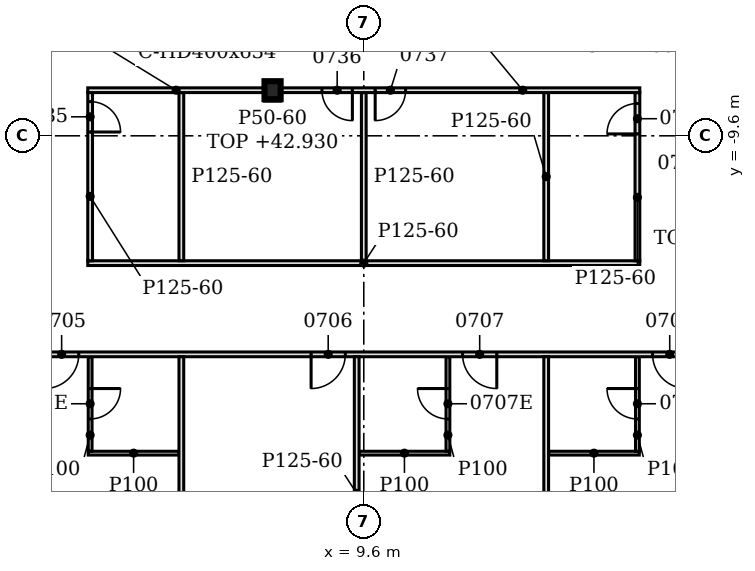
"""IFC4 building model, lengths in metres.
Left out: names, types, materials, properties, quantities, classifications, styles, units other than length and angle.
Written with IfcOpenShell. Run it as: python <this file> out.ifc"""

import sys

from ifc_helpers import new_model, si_unit, direction, frame, frame_2d, origin, origin_2d, place, context, subcontext, project, spatial, polyline, rectangle, i_section, outline, extrude, element, fill, save


model = new_model("IFC4")
c1 = context("Model", 3, precision=1e-05, world=origin(), true_north=direction((0.0, 1.0)))
c2 = subcontext(c1, "Body", "Model", "MODEL_VIEW")
j1 = project(units=[si_unit("LENGTHUNIT", "METRE"), si_unit("PLANEANGLEUNIT", "RADIAN")], contexts=[c1])
p1 = place(None, origin())
s1 = spatial("IfcSite", under=j1, at=p1, CompositionType="ELEMENT")
p2 = place(p1, origin())
s2 = spatial("IfcBuilding", under=s1, at=p2, CompositionType="ELEMENT")
p3 = place(p2, frame((0.0, 0.0, 40.2)))
s3 = spatial("IfcBuildingStorey", under=s2, at=p3, CompositionType="ELEMENT", Elevation=40.2)
p4 = place(p3, frame((7.2, -8.4, -0.15), z_axis=(0.0, 0.0, 1.0), x_axis=(1.0, 0.0, 0.0)))
e1 = element("IfcColumn", 1, at=p4, inside=s3, PredefinedType="COLUMN", context=c2, shape_type="SweptSolid", body=[
    extrude(i_section(OverallWidth=0.424, OverallDepth=0.474, WebThickness=0.048, FlangeThickness=0.077, FilletRadius=0.015, at=origin_2d()), origin(), (0.0, 0.0, 1.0), 3.6),
])
for number, where, z_axis, x_axis in (
    (2, (4.8, -23.65, 0.0), (0.0, 0.0, 1.0), (0.0, 1.0, 0.0)),
    (3, (14.4, -23.65, 0.0), (0.0, 0.0, 1.0), (0.0, 1.0, 0.0)),
):
    element("IfcWall", number, at=place(p3, frame(where, z_axis=z_axis, x_axis=x_axis)), inside=s3, PredefinedType="PARTITIONING", context=c2, shape_type="SweptSolid", body=[
        extrude(outline(polyline([(0.0, 0.0), (8.237, 0.0), (8.238, 3.45), (4.555, 3.45), (4.553, 2.88), (4.345, 2.88), (4.343, 3.45), (0.7, 3.45), (0.698, 2.93), (0.4, 2.93), (0.398, 3.45), (0.0, 3.45), (0.0, 0.0)])), frame((0.0, 0.062, 0.0), z_axis=(0.0, -1.0, 0.0), x_axis=(1.0, 0.0, 0.0)), (0.0, 0.0, 1.0), 0.125),
    ])
p5 = place(p3, frame((9.414, -22.6, 0.0), z_axis=(0.0, 0.0, 1.0), x_axis=(0.0, 1.0, 0.0)))
e4 = element("IfcWall", 4, at=p5, inside=s3, PredefinedType="PARTITIONING", context=c2, shape_type="SweptSolid", body=[
    extrude(outline(polyline([(0.0, 0.0), (7.188, 0.0), (7.188, 3.45), (3.505, 3.45), (3.503, 2.88), (3.295, 2.88), (3.293, 3.45), (0.0, 3.45), (0.0, 0.0)])), frame((0.0, 0.062, 0.0), z_axis=(0.0, -1.0, 0.0), x_axis=(1.0, 0.0, 0.0)), (0.0, 0.0, 1.0), 0.125),
])
p6 = place(p3, frame((2.35, -17.95, 0.0), z_axis=(0.0, 0.0, 1.0), x_axis=(1.0, 0.0, 0.0)))
e5 = element("IfcWall", 5, at=p6, inside=s3, PredefinedType="PARTITIONING", context=c2, shape_type="SweptSolid", body=[
    extrude(rectangle(XDim=2.387, YDim=0.1, at=frame_2d((1.194, 0.0))), origin(), (0.0, 0.0, 1.0), 3.45),
])
p7 = place(p3, frame((2.4, -17.9, 0.0), z_axis=(0.0, 0.0, 1.0), x_axis=(0.0, 1.0, 0.0)))
e6 = element("IfcWall", 6, at=p7, inside=s3, PredefinedType="PARTITIONING", context=c2, shape_type="SweptSolid", body=[
    extrude(rectangle(XDim=2.487, YDim=0.1, at=frame_2d((1.244, 0.0))), origin(), (0.0, 0.0, 1.0), 3.45),
])
p8 = place(p7, frame((0.85, 0.0, 0.0)))
e7 = element("IfcOpeningElement", 7, at=p8, cuts=e6, PredefinedType="OPENING", context=c2, shape_type="SweptSolid", body=[
    extrude(rectangle(XDim=0.8, YDim=2.1, at=frame_2d((0.4, 1.05))), frame((0.0, 0.06, 0.0), z_axis=(0.0, -1.0, 0.0), x_axis=(1.0, 0.0, 0.0)), (0.0, 0.0, 1.0), 0.12),
])
p9 = place(p3, frame((9.477, -17.95, 0.0), z_axis=(0.0, 0.0, 1.0), x_axis=(1.0, 0.0, 0.0)))
e8 = element("IfcWall", 8, at=p9, inside=s3, PredefinedType="PARTITIONING", context=c2, shape_type="SweptSolid", body=[
    extrude(rectangle(XDim=2.387, YDim=0.1, at=frame_2d((1.194, 0.0))), origin(), (0.0, 0.0, 1.0), 3.45),
])
p10 = place(p3, frame((11.814, -17.9, 0.0), z_axis=(0.0, 0.0, 1.0), x_axis=(0.0, 1.0, 0.0)))
e9 = element("IfcWall", 9, at=p10, inside=s3, PredefinedType="PARTITIONING", context=c2, shape_type="SweptSolid", body=[
    extrude(rectangle(XDim=2.487, YDim=0.1, at=frame_2d((1.244, 0.0))), origin(), (0.0, 0.0, 1.0), 3.45),
])
p11 = place(p10, frame((0.85, 0.0, 0.0)))
e10 = element("IfcOpeningElement", 10, at=p11, cuts=e9, PredefinedType="OPENING", context=c2, shape_type="SweptSolid", body=[
    extrude(rectangle(XDim=0.8, YDim=2.1, at=frame_2d((0.4, 1.05))), frame((0.0, 0.06, 0.0), z_axis=(0.0, -1.0, 0.0), x_axis=(1.0, 0.0, 0.0)), (0.0, 0.0, 1.0), 0.12),
])
p12 = place(p3, frame((14.462, -17.95, 0.0), z_axis=(0.0, 0.0, 1.0), x_axis=(1.0, 0.0, 0.0)))
e11 = element("IfcWall", 11, at=p12, inside=s3, PredefinedType="PARTITIONING", context=c2, shape_type="SweptSolid", body=[
    extrude(rectangle(XDim=2.388, YDim=0.1, at=frame_2d((1.194, 0.0))), origin(), (0.0, 0.0, 1.0), 3.45),
])
p13 = place(p3, frame((16.8, -17.9, 0.0), z_axis=(0.0, 0.0, 1.0), x_axis=(0.0, 1.0, 0.0)))
e12 = element("IfcWall", 12, at=p13, inside=s3, PredefinedType="PARTITIONING", context=c2, shape_type="SweptSolid", body=[
    extrude(rectangle(XDim=2.487, YDim=0.1, at=frame_2d((1.244, 0.0))), origin(), (0.0, 0.0, 1.0), 3.45),
])
p14 = place(p13, frame((0.85, 0.0, 0.0)))
e13 = element("IfcOpeningElement", 13, at=p14, cuts=e12, PredefinedType="OPENING", context=c2, shape_type="SweptSolid", body=[
    extrude(rectangle(XDim=0.8, YDim=2.1, at=frame_2d((0.4, 1.05))), frame((0.0, 0.06, 0.0), z_axis=(0.0, -1.0, 0.0), x_axis=(1.0, 0.0, 0.0)), (0.0, 0.0, 1.0), 0.12),
])
p15 = place(p3, frame((-20.15, -15.35, 0.0), z_axis=(0.0, 0.0, 1.0), x_axis=(1.0, 0.0, 0.0)))
e14 = element("IfcWall", 14, at=p15, inside=s3, PredefinedType="PARTITIONING", context=c2, shape_type="SweptSolid", body=[
    extrude(outline(polyline([(0.0, 0.0), (39.287, 0.0), (39.288, 2.73), (39.2, 2.73), (39.198, 3.45), (27.5, 3.45), (27.498, 2.73), (27.2, 2.73), (27.198, 3.45), (15.5, 3.45), (15.498, 2.73), (15.2, 2.73), (15.198, 3.45), (5.9, 3.45), (5.898, 2.93), (5.6, 2.93), (5.598, 3.45), (0.0, 3.45), (0.0, 0.0)])), frame((0.0, 0.062, 0.0), z_axis=(0.0, -1.0, 0.0), x_axis=(1.0, 0.0, 0.0)), (0.0, 0.0, 1.0), 0.125),
])
p16 = place(p15, frame((4.55, 0.0, 0.0)))
e15 = element("IfcOpeningElement", 15, at=p16, cuts=e14, PredefinedType="OPENING", context=c2, shape_type="SweptSolid", body=[
    extrude(rectangle(XDim=0.9, YDim=2.1, at=frame_2d((0.45, 1.05))), frame((0.0, 0.073, 0.0), z_axis=(0.0, -1.0, 0.0), x_axis=(1.0, 0.0, 0.0)), (0.0, 0.0, 1.0), 0.145),
])
p17 = place(p15, frame((7.136, 0.0, 0.0)))
e16 = element("IfcOpeningElement", 16, at=p17, cuts=e14, PredefinedType="OPENING", context=c2, shape_type="SweptSolid", body=[
    extrude(rectangle(XDim=0.9, YDim=2.1, at=frame_2d((0.45, 1.05))), frame((0.0, 0.073, 0.0), z_axis=(0.0, -1.0, 0.0), x_axis=(1.0, 0.0, 0.0)), (0.0, 0.0, 1.0), 0.145),
])
p18 = place(p15, frame((14.15, 0.0, 0.0)))
e17 = element("IfcOpeningElement", 17, at=p18, cuts=e14, PredefinedType="OPENING", context=c2, shape_type="SweptSolid", body=[
    extrude(rectangle(XDim=0.9, YDim=2.1, at=frame_2d((0.45, 1.05))), frame((0.0, 0.073, 0.0), z_axis=(0.0, -1.0, 0.0), x_axis=(1.0, 0.0, 0.0)), (0.0, 0.0, 1.0), 0.145),
])
p19 = place(p15, frame((16.55, 0.0, 0.0)))
e18 = element("IfcOpeningElement", 18, at=p19, cuts=e14, PredefinedType="OPENING", context=c2, shape_type="SweptSolid", body=[
    extrude(rectangle(XDim=0.9, YDim=2.1, at=frame_2d((0.45, 1.05))), frame((0.0, 0.073, 0.0), z_axis=(0.0, -1.0, 0.0), x_axis=(1.0, 0.0, 0.0)), (0.0, 0.0, 1.0), 0.145),
])
p20 = place(p15, frame((21.35, 0.0, 0.0)))
e19 = element("IfcOpeningElement", 19, at=p20, cuts=e14, PredefinedType="OPENING", context=c2, shape_type="SweptSolid", body=[
    extrude(rectangle(XDim=0.9, YDim=2.1, at=frame_2d((0.45, 1.05))), frame((0.0, 0.073, 0.0), z_axis=(0.0, -1.0, 0.0), x_axis=(1.0, 0.0, 0.0)), (0.0, 0.0, 1.0), 0.145),
])
p21 = place(p15, frame((28.364, 0.0, 0.0)))
e20 = element("IfcOpeningElement", 20, at=p21, cuts=e14, PredefinedType="OPENING", context=c2, shape_type="SweptSolid", body=[
    extrude(rectangle(XDim=0.9, YDim=2.1, at=frame_2d((0.45, 1.05))), frame((0.0, 0.073, 0.0), z_axis=(0.0, -1.0, 0.0), x_axis=(1.0, 0.0, 0.0)), (0.0, 0.0, 1.0), 0.145),
])
p22 = place(p15, frame((32.35, 0.0, 0.0)))
e21 = element("IfcOpeningElement", 21, at=p22, cuts=e14, PredefinedType="OPENING", context=c2, shape_type="SweptSolid", body=[
    extrude(rectangle(XDim=0.9, YDim=2.1, at=frame_2d((0.45, 1.05))), frame((0.0, 0.073, 0.0), z_axis=(0.0, -1.0, 0.0), x_axis=(1.0, 0.0, 0.0)), (0.0, 0.0, 1.0), 0.145),
])
p23 = place(p15, frame((37.35, 0.0, 0.0)))
e22 = element("IfcOpeningElement", 22, at=p23, cuts=e14, PredefinedType="OPENING", context=c2, shape_type="SweptSolid", body=[
    extrude(rectangle(XDim=0.9, YDim=2.1, at=frame_2d((0.45, 1.05))), frame((0.0, 0.073, 0.0), z_axis=(0.0, -1.0, 0.0), x_axis=(1.0, 0.0, 0.0)), (0.0, 0.0, 1.0), 0.145),
])
p24 = place(p3, frame((2.337, -12.95, 0.0), z_axis=(0.0, 0.0, 1.0), x_axis=(1.0, 0.0, 0.0)))
e23 = element("IfcWall", 23, at=p24, inside=s3, PredefinedType="PARTITIONING", context=c2, shape_type="SweptSolid", body=[
    extrude(outline(polyline([(0.0, 0.0), (14.525, 0.0), (14.525, 3.45), (5.012, 3.45), (5.01, 2.73), (4.712, 2.73), (4.71, 3.45), (0.0, 3.45), (0.0, 0.0)])), frame((0.0, 0.062, 0.0), z_axis=(0.0, -1.0, 0.0), x_axis=(1.0, 0.0, 0.0)), (0.0, 0.0, 1.0), 0.125),
])
p25 = place(p3, frame((2.4, -12.887, 0.0), z_axis=(0.0, 0.0, 1.0), x_axis=(0.0, 1.0, 0.0)))
e24 = element("IfcWall", 24, at=p25, inside=s3, PredefinedType="PARTITIONING", context=c2, shape_type="SweptSolid", body=[
    extrude(outline(polyline([(0.0, 0.0), (4.425, 0.0), (4.425, 2.83), (4.337, 2.83), (4.335, 3.45), (0.0, 3.45), (0.0, 0.0)])), frame((0.0, 0.062, 0.0), z_axis=(0.0, -1.0, 0.0), x_axis=(1.0, 0.0, 0.0)), (0.0, 0.0, 1.0), 0.125),
])
p26 = place(p25, frame((3.387, 0.0, 0.0)))
e25 = element("IfcOpeningElement", 25, at=p26, cuts=e24, PredefinedType="OPENING", context=c2, shape_type="SweptSolid", body=[
    extrude(rectangle(XDim=0.8, YDim=2.1, at=frame_2d((0.4, 1.05))), frame((0.0, 0.073, 0.0), z_axis=(0.0, -1.0, 0.0), x_axis=(1.0, 0.0, 0.0)), (0.0, 0.0, 1.0), 0.145),
])
for number, where, z_axis, x_axis in (
    (26, (4.8, -12.887, 0.0), (0.0, 0.0, 1.0), (0.0, 1.0, 0.0)),
    (27, (9.6, -12.887, 0.0), (0.0, 0.0, 1.0), (0.0, 1.0, 0.0)),
    (28, (14.4, -12.887, 0.0), (0.0, 0.0, 1.0), (0.0, 1.0, 0.0)),
):
    element("IfcWall", number, at=place(p3, frame(where, z_axis=z_axis, x_axis=x_axis)), inside=s3, PredefinedType="PARTITIONING", context=c2, shape_type="SweptSolid", body=[
        extrude(outline(polyline([(0.0, 0.0), (4.425, 0.0), (4.425, 2.83), (4.337, 2.83), (4.335, 3.45), (0.0, 3.45), (0.0, 0.0)])), frame((0.0, 0.062, 0.0), z_axis=(0.0, -1.0, 0.0), x_axis=(1.0, 0.0, 0.0)), (0.0, 0.0, 1.0), 0.125),
    ])
p27 = place(p3, frame((16.8, -12.887, 0.0), z_axis=(0.0, 0.0, 1.0), x_axis=(0.0, 1.0, 0.0)))
e29 = element("IfcWall", 29, at=p27, inside=s3, PredefinedType="PARTITIONING", context=c2, shape_type="SweptSolid", body=[
    extrude(outline(polyline([(0.0, 0.0), (4.425, 0.0), (4.425, 2.83), (4.337, 2.83), (4.335, 3.45), (0.0, 3.45), (0.0, 0.0)])), frame((0.0, 0.062, 0.0), z_axis=(0.0, -1.0, 0.0), x_axis=(1.0, 0.0, 0.0)), (0.0, 0.0, 1.0), 0.125),
])
p28 = place(p27, frame((3.337, 0.0, 0.0)))
e30 = element("IfcOpeningElement", 30, at=p28, cuts=e29, PredefinedType="OPENING", context=c2, shape_type="SweptSolid", body=[
    extrude(rectangle(XDim=0.8, YDim=2.1, at=frame_2d((0.4, 1.05))), frame((0.0, 0.073, 0.0), z_axis=(0.0, -1.0, 0.0), x_axis=(1.0, 0.0, 0.0)), (0.0, 0.0, 1.0), 0.145),
])
p29 = place(p3, frame((2.337, -8.4, 0.0), z_axis=(0.0, 0.0, 1.0), x_axis=(1.0, 0.0, 0.0)))
e31 = element("IfcWall", 31, at=p29, inside=s3, PredefinedType="PARTITIONING", context=c2, shape_type="SweptSolid", body=[
    extrude(rectangle(XDim=4.651, YDim=0.125, at=frame_2d((2.325, 0.0))), origin(), (0.0, 0.0, 1.0), 2.83),
])
p30 = place(p3, frame((7.412, -8.4, 0.0), z_axis=(0.0, 0.0, 1.0), x_axis=(1.0, 0.0, 0.0)))
e32 = element("IfcWall", 32, at=p30, inside=s3, PredefinedType="PARTITIONING", context=c2, shape_type="SweptSolid", body=[
    extrude(rectangle(XDim=9.45, YDim=0.125, at=frame_2d((4.725, 0.0))), origin(), (0.0, 0.0, 1.0), 2.83),
])
p31 = place(p30, frame((1.088, 0.0, 0.0)))
e33 = element("IfcOpeningElement", 33, at=p31, cuts=e32, PredefinedType="OPENING", context=c2, shape_type="SweptSolid", body=[
    extrude(rectangle(XDim=0.8, YDim=2.1, at=frame_2d((0.4, 1.05))), frame((0.0, 0.073, 0.0), z_axis=(0.0, -1.0, 0.0), x_axis=(1.0, 0.0, 0.0)), (0.0, 0.0, 1.0), 0.145),
])
p32 = place(p30, frame((2.488, 0.0, 0.0)))
e34 = element("IfcOpeningElement", 34, at=p32, cuts=e32, PredefinedType="OPENING", context=c2, shape_type="SweptSolid", body=[
    extrude(rectangle(XDim=0.8, YDim=2.1, at=frame_2d((0.4, 1.05))), frame((0.0, 0.073, 0.0), z_axis=(0.0, -1.0, 0.0), x_axis=(1.0, 0.0, 0.0)), (0.0, 0.0, 1.0), 0.145),
])
p33 = place(p3, frame((6.988, -8.662, 0.0), z_axis=(0.0, 0.0, 1.0), x_axis=(1.0, 0.0, 0.0)))
e35 = element("IfcWall", 35, at=p33, inside=s3, PredefinedType="PARTITIONING", context=c2, shape_type="SweptSolid", body=[
    extrude(rectangle(XDim=0.424, YDim=0.05, at=frame_2d((0.212, 0.0))), origin(), (0.0, 0.0, 1.0), 2.73),
])
p34 = place(p20, frame((0.9, 0.0, 0.0), z_axis=(0.0, 0.0, 1.0), x_axis=(-1.0, 0.0, 0.0)))
e36 = element("IfcDoor", 36, at=p34, inside=s3, OperationType="SINGLE_SWING_RIGHT", PredefinedType="DOOR", context=c2, shape_type="SweptSolid", body=[
    extrude(rectangle(XDim=0.9, YDim=2.1, at=frame_2d((0.45, 1.05))), frame((0.0, 0.025, 0.0), z_axis=(0.0, -1.0, 0.0), x_axis=(1.0, 0.0, 0.0)), (0.0, 0.0, 1.0), 0.05),
])
fill(e19, e36)
p35 = place(p8, frame((0.8, 0.0, 0.0), z_axis=(0.0, 0.0, 1.0), x_axis=(-1.0, 0.0, 0.0)))
e37 = element("IfcDoor", 37, at=p35, inside=s3, OperationType="SINGLE_SWING_LEFT", PredefinedType="DOOR", context=c2, shape_type="SweptSolid", body=[
    extrude(rectangle(XDim=0.8, YDim=2.1, at=frame_2d((0.4, 1.05))), frame((0.0, 0.025, 0.0), z_axis=(0.0, -1.0, 0.0), x_axis=(1.0, 0.0, 0.0)), (0.0, 0.0, 1.0), 0.05),
])
fill(e7, e37)
p36 = place(p21, frame((0.9, 0.0, 0.0), z_axis=(0.0, 0.0, 1.0), x_axis=(-1.0, 0.0, 0.0)))
e38 = element("IfcDoor", 38, at=p36, inside=s3, OperationType="SINGLE_SWING_RIGHT", PredefinedType="DOOR", context=c2, shape_type="SweptSolid", body=[
    extrude(rectangle(XDim=0.9, YDim=2.1, at=frame_2d((0.45, 1.05))), frame((0.0, 0.025, 0.0), z_axis=(0.0, -1.0, 0.0), x_axis=(1.0, 0.0, 0.0)), (0.0, 0.0, 1.0), 0.05),
])
fill(e20, e38)
p37 = place(p22, frame((0.9, 0.0, 0.0), z_axis=(0.0, 0.0, 1.0), x_axis=(-1.0, 0.0, 0.0)))
e39 = element("IfcDoor", 39, at=p37, inside=s3, OperationType="SINGLE_SWING_LEFT", PredefinedType="DOOR", context=c2, shape_type="SweptSolid", body=[
    extrude(rectangle(XDim=0.9, YDim=2.1, at=frame_2d((0.45, 1.05))), frame((0.0, 0.025, 0.0), z_axis=(0.0, -1.0, 0.0), x_axis=(1.0, 0.0, 0.0)), (0.0, 0.0, 1.0), 0.05),
])
fill(e21, e39)
p38 = place(p11, origin())
e40 = element("IfcDoor", 40, at=p38, inside=s3, OperationType="SINGLE_SWING_RIGHT", PredefinedType="DOOR", context=c2, shape_type="SweptSolid", body=[
    extrude(rectangle(XDim=0.8, YDim=2.1, at=frame_2d((0.4, 1.05))), frame((0.0, 0.025, 0.0), z_axis=(0.0, -1.0, 0.0), x_axis=(1.0, 0.0, 0.0)), (0.0, 0.0, 1.0), 0.05),
])
fill(e10, e40)
p39 = place(p23, frame((0.9, 0.0, 0.0), z_axis=(0.0, 0.0, 1.0), x_axis=(-1.0, 0.0, 0.0)))
e41 = element("IfcDoor", 41, at=p39, inside=s3, OperationType="SINGLE_SWING_LEFT", PredefinedType="DOOR", context=c2, shape_type="SweptSolid", body=[
    extrude(rectangle(XDim=0.9, YDim=2.1, at=frame_2d((0.45, 1.05))), frame((0.0, 0.025, 0.0), z_axis=(0.0, -1.0, 0.0), x_axis=(1.0, 0.0, 0.0)), (0.0, 0.0, 1.0), 0.05),
])
fill(e22, e41)
p40 = place(p14, origin())
e42 = element("IfcDoor", 42, at=p40, inside=s3, OperationType="SINGLE_SWING_RIGHT", PredefinedType="DOOR", context=c2, shape_type="SweptSolid", body=[
    extrude(rectangle(XDim=0.8, YDim=2.1, at=frame_2d((0.4, 1.05))), frame((0.0, 0.025, 0.0), z_axis=(0.0, -1.0, 0.0), x_axis=(1.0, 0.0, 0.0)), (0.0, 0.0, 1.0), 0.05),
])
fill(e13, e42)
p41 = place(p26, frame((0.8, 0.0, 0.0), z_axis=(0.0, 0.0, 1.0), x_axis=(-1.0, 0.0, 0.0)))
e43 = element("IfcDoor", 43, at=p41, inside=s3, OperationType="SINGLE_SWING_RIGHT", PredefinedType="DOOR", context=c2, shape_type="SweptSolid", body=[
    extrude(rectangle(XDim=0.8, YDim=2.1, at=frame_2d((0.4, 1.05))), frame((0.0, 0.025, 0.0), z_axis=(0.0, -1.0, 0.0), x_axis=(1.0, 0.0, 0.0)), (0.0, 0.0, 1.0), 0.05),
])
fill(e25, e43)
p42 = place(p31, frame((0.8, 0.0, 0.0), z_axis=(0.0, 0.0, 1.0), x_axis=(-1.0, 0.0, 0.0)))
e44 = element("IfcDoor", 44, at=p42, inside=s3, OperationType="SINGLE_SWING_LEFT", PredefinedType="DOOR", context=c2, shape_type="SweptSolid", body=[
    extrude(rectangle(XDim=0.8, YDim=2.1, at=frame_2d((0.4, 1.05))), frame((0.0, 0.025, 0.0), z_axis=(0.0, -1.0, 0.0), x_axis=(1.0, 0.0, 0.0)), (0.0, 0.0, 1.0), 0.05),
])
fill(e33, e44)
p43 = place(p32, frame((0.8, 0.0, 0.0), z_axis=(0.0, 0.0, 1.0), x_axis=(-1.0, 0.0, 0.0)))
e45 = element("IfcDoor", 45, at=p43, inside=s3, OperationType="SINGLE_SWING_RIGHT", PredefinedType="DOOR", context=c2, shape_type="SweptSolid", body=[
    extrude(rectangle(XDim=0.8, YDim=2.1, at=frame_2d((0.4, 1.05))), frame((0.0, 0.025, 0.0), z_axis=(0.0, -1.0, 0.0), x_axis=(1.0, 0.0, 0.0)), (0.0, 0.0, 1.0), 0.05),
])
fill(e34, e45)
p44 = place(p28, origin())
e46 = element("IfcDoor", 46, at=p44, inside=s3, OperationType="SINGLE_SWING_LEFT", PredefinedType="DOOR", context=c2, shape_type="SweptSolid", body=[
    extrude(rectangle(XDim=0.8, YDim=2.1, at=frame_2d((0.4, 1.05))), frame((0.0, 0.025, 0.0), z_axis=(0.0, -1.0, 0.0), x_axis=(1.0, 0.0, 0.0)), (0.0, 0.0, 1.0), 0.05),
])
fill(e30, e46)
save(model, sys.argv[1])
